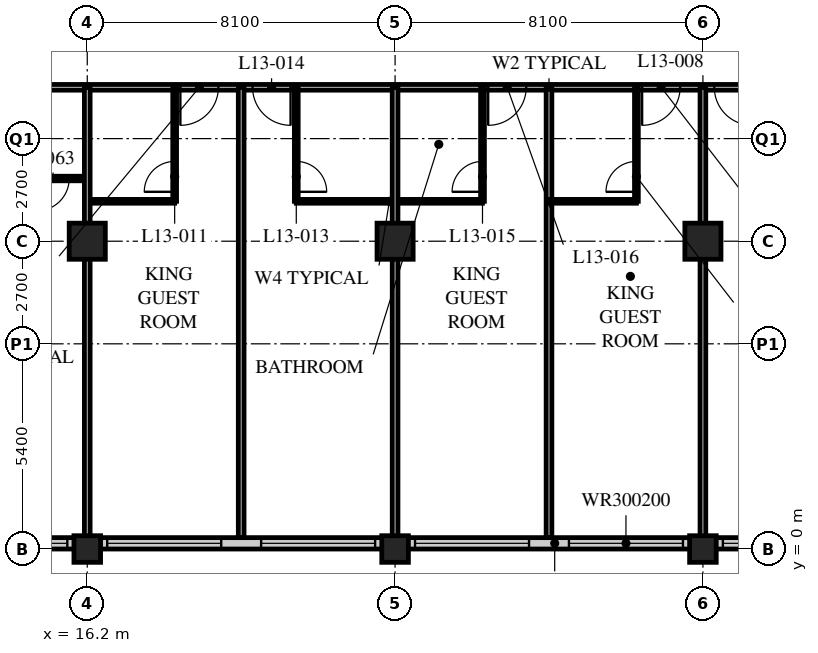
"""IFC4 building model, lengths in metres.
Left out: names, types, materials, properties, quantities, classifications, styles, units other than length and angle.
Written with IfcOpenShell. Run it as: python <this file> out.ifc"""

import sys

from ifc_helpers import new_model, si_unit, direction, frame, frame_2d, origin, origin_2d, place, context, subcontext, project, spatial, rectangle, hollow_rectangle, extrude, element, fill, save


model = new_model("IFC4")
c1 = context("Model", 3, precision=1e-05, world=origin(), true_north=direction((0.0, 1.0)))
c2 = subcontext(c1, "Body", "Model", "MODEL_VIEW")
j1 = project(units=[si_unit("LENGTHUNIT", "METRE"), si_unit("PLANEANGLEUNIT", "RADIAN")], contexts=[c1])
p1 = place(None, origin())
s1 = spatial("IfcSite", under=j1, at=p1, CompositionType="ELEMENT")
p2 = place(p1, origin())
s2 = spatial("IfcBuilding", under=s1, at=p2, CompositionType="ELEMENT")
p3 = place(p2, frame((0.0, 0.0, 56.8)))
s3 = spatial("IfcBuildingStorey", under=s2, at=p3, CompositionType="ELEMENT", Elevation=56.8)
p4 = place(p3, frame((16.2, 0.0, 0.0), z_axis=(0.0, 0.0, 1.0), x_axis=(1.0, 0.0, 0.0)))
e1 = element("IfcColumn", 1, at=p4, inside=s3, PredefinedType="COLUMN", context=c2, shape_type="SweptSolid", body=[
    extrude(hollow_rectangle(XDim=0.7, YDim=0.7, WallThickness=0.06, at=origin_2d()), origin(), (0.0, 0.0, 1.0), 3.4),
])
p5 = place(p3, frame((16.2, 8.1, 0.0), z_axis=(0.0, 0.0, 1.0), x_axis=(1.0, 0.0, 0.0)))
e2 = element("IfcColumn", 2, at=p5, inside=s3, PredefinedType="COLUMN", context=c2, shape_type="SweptSolid", body=[
    extrude(hollow_rectangle(XDim=0.95, YDim=0.95, WallThickness=0.095, at=origin_2d()), origin(), (0.0, 0.0, 1.0), 3.4),
])
p6 = place(p3, frame((24.3, 0.0, 0.0), z_axis=(0.0, 0.0, 1.0), x_axis=(1.0, 0.0, 0.0)))
e3 = element("IfcColumn", 3, at=p6, inside=s3, PredefinedType="COLUMN", context=c2, shape_type="SweptSolid", body=[
    extrude(hollow_rectangle(XDim=0.7, YDim=0.7, WallThickness=0.06, at=origin_2d()), origin(), (0.0, 0.0, 1.0), 3.4),
])
p7 = place(p3, frame((24.3, 8.1, 0.0), z_axis=(0.0, 0.0, 1.0), x_axis=(1.0, 0.0, 0.0)))
e4 = element("IfcColumn", 4, at=p7, inside=s3, PredefinedType="COLUMN", context=c2, shape_type="SweptSolid", body=[
    extrude(hollow_rectangle(XDim=0.95, YDim=0.95, WallThickness=0.095, at=origin_2d()), origin(), (0.0, 0.0, 1.0), 3.4),
])
p8 = place(p3, frame((32.4, 0.0, 0.0), z_axis=(0.0, 0.0, 1.0), x_axis=(1.0, 0.0, 0.0)))
e5 = element("IfcColumn", 5, at=p8, inside=s3, PredefinedType="COLUMN", context=c2, shape_type="SweptSolid", body=[
    extrude(hollow_rectangle(XDim=0.7, YDim=0.7, WallThickness=0.06, at=origin_2d()), origin(), (0.0, 0.0, 1.0), 3.4),
])
p9 = place(p3, frame((32.4, 8.1, 0.0), z_axis=(0.0, 0.0, 1.0), x_axis=(1.0, 0.0, 0.0)))
e6 = element("IfcColumn", 6, at=p9, inside=s3, PredefinedType="COLUMN", context=c2, shape_type="SweptSolid", body=[
    extrude(hollow_rectangle(XDim=0.95, YDim=0.95, WallThickness=0.095, at=origin_2d()), origin(), (0.0, 0.0, 1.0), 3.4),
])
p10 = place(p3, frame((8.4, 0.15, 0.0), z_axis=(0.0, 0.0, 1.0), x_axis=(1.0, 0.0, 0.0)))
e7 = element("IfcWall", 7, at=p10, inside=s3, PredefinedType="SOLIDWALL", context=c2, shape_type="SweptSolid", body=[
    extrude(rectangle(XDim=40.2, YDim=0.3, at=frame_2d((20.1, 0.0))), origin(), (0.0, 0.0, 1.0), 3.19),
])
p11 = place(p10, frame((0.225, 0.0, 0.9)))
e8 = element("IfcOpeningElement", 8, at=p11, cuts=e7, PredefinedType="OPENING", context=c2, shape_type="SweptSolid", body=[
    extrude(rectangle(XDim=3.0, YDim=2.0, at=frame_2d((1.5, 1.0))), frame((0.0, 0.16, 0.0), z_axis=(0.0, -1.0, 0.0), x_axis=(1.0, 0.0, 0.0)), (0.0, 0.0, 1.0), 0.32),
])
p12 = place(p10, frame((4.275, 0.0, 0.9)))
e9 = element("IfcOpeningElement", 9, at=p12, cuts=e7, PredefinedType="OPENING", context=c2, shape_type="SweptSolid", body=[
    extrude(rectangle(XDim=3.0, YDim=2.0, at=frame_2d((1.5, 1.0))), frame((0.0, 0.16, 0.0), z_axis=(0.0, -1.0, 0.0), x_axis=(1.0, 0.0, 0.0)), (0.0, 0.0, 1.0), 0.32),
])
p13 = place(p10, frame((8.325, 0.0, 0.9)))
e10 = element("IfcOpeningElement", 10, at=p13, cuts=e7, PredefinedType="OPENING", context=c2, shape_type="SweptSolid", body=[
    extrude(rectangle(XDim=3.0, YDim=2.0, at=frame_2d((1.5, 1.0))), frame((0.0, 0.16, 0.0), z_axis=(0.0, -1.0, 0.0), x_axis=(1.0, 0.0, 0.0)), (0.0, 0.0, 1.0), 0.32),
])
p14 = place(p10, frame((12.375, 0.0, 0.9)))
e11 = element("IfcOpeningElement", 11, at=p14, cuts=e7, PredefinedType="OPENING", context=c2, shape_type="SweptSolid", body=[
    extrude(rectangle(XDim=3.0, YDim=2.0, at=frame_2d((1.5, 1.0))), frame((0.0, 0.16, 0.0), z_axis=(0.0, -1.0, 0.0), x_axis=(1.0, 0.0, 0.0)), (0.0, 0.0, 1.0), 0.32),
])
p15 = place(p10, frame((16.425, 0.0, 0.9)))
e12 = element("IfcOpeningElement", 12, at=p15, cuts=e7, PredefinedType="OPENING", context=c2, shape_type="SweptSolid", body=[
    extrude(rectangle(XDim=3.0, YDim=2.0, at=frame_2d((1.5, 1.0))), frame((0.0, 0.16, 0.0), z_axis=(0.0, -1.0, 0.0), x_axis=(1.0, 0.0, 0.0)), (0.0, 0.0, 1.0), 0.32),
])
p16 = place(p10, frame((20.475, 0.0, 0.9)))
e13 = element("IfcOpeningElement", 13, at=p16, cuts=e7, PredefinedType="OPENING", context=c2, shape_type="SweptSolid", body=[
    extrude(rectangle(XDim=3.0, YDim=2.0, at=frame_2d((1.5, 1.0))), frame((0.0, 0.16, 0.0), z_axis=(0.0, -1.0, 0.0), x_axis=(1.0, 0.0, 0.0)), (0.0, 0.0, 1.0), 0.32),
])
p17 = place(p10, frame((24.525, 0.0, 0.9)))
e14 = element("IfcOpeningElement", 14, at=p17, cuts=e7, PredefinedType="OPENING", context=c2, shape_type="SweptSolid", body=[
    extrude(rectangle(XDim=3.0, YDim=2.0, at=frame_2d((1.5, 1.0))), frame((0.0, 0.16, 0.0), z_axis=(0.0, -1.0, 0.0), x_axis=(1.0, 0.0, 0.0)), (0.0, 0.0, 1.0), 0.32),
])
p18 = place(p10, frame((28.575, 0.0, 0.9)))
e15 = element("IfcOpeningElement", 15, at=p18, cuts=e7, PredefinedType="OPENING", context=c2, shape_type="SweptSolid", body=[
    extrude(rectangle(XDim=3.0, YDim=2.0, at=frame_2d((1.5, 1.0))), frame((0.0, 0.16, 0.0), z_axis=(0.0, -1.0, 0.0), x_axis=(1.0, 0.0, 0.0)), (0.0, 0.0, 1.0), 0.32),
])
p19 = place(p10, frame((32.625, 0.0, 0.9)))
e16 = element("IfcOpeningElement", 16, at=p19, cuts=e7, PredefinedType="OPENING", context=c2, shape_type="SweptSolid", body=[
    extrude(rectangle(XDim=3.0, YDim=2.0, at=frame_2d((1.5, 1.0))), frame((0.0, 0.16, 0.0), z_axis=(0.0, -1.0, 0.0), x_axis=(1.0, 0.0, 0.0)), (0.0, 0.0, 1.0), 0.32),
])
p20 = place(p10, frame((36.675, 0.0, 0.9)))
e17 = element("IfcOpeningElement", 17, at=p20, cuts=e7, PredefinedType="OPENING", context=c2, shape_type="SweptSolid", body=[
    extrude(rectangle(XDim=3.0, YDim=2.0, at=frame_2d((1.5, 1.0))), frame((0.0, 0.16, 0.0), z_axis=(0.0, -1.0, 0.0), x_axis=(1.0, 0.0, 0.0)), (0.0, 0.0, 1.0), 0.32),
])
p21 = place(p3, frame((12.15, 12.15, 0.0), z_axis=(0.0, 0.0, 1.0), x_axis=(1.0, 0.0, 0.0)))
e18 = element("IfcWall", 18, at=p21, inside=s3, PredefinedType="PARTITIONING", context=c2, shape_type="SweptSolid", body=[
    extrude(rectangle(XDim=32.4, YDim=0.15, at=frame_2d((16.2, 0.0))), origin(), (0.0, 0.0, 1.0), 3.19),
])
p22 = place(p21, frame((6.5, 0.0, 0.0)))
e19 = element("IfcOpeningElement", 19, at=p22, cuts=e18, PredefinedType="OPENING", context=c2, shape_type="SweptSolid", body=[
    extrude(rectangle(XDim=1.0, YDim=2.1, at=frame_2d((0.5, 1.05))), frame((0.0, 0.085, 0.0), z_axis=(0.0, -1.0, 0.0), x_axis=(1.0, 0.0, 0.0)), (0.0, 0.0, 1.0), 0.17),
])
p23 = place(p21, frame((8.4, 0.0, 0.0)))
e20 = element("IfcOpeningElement", 20, at=p23, cuts=e18, PredefinedType="OPENING", context=c2, shape_type="SweptSolid", body=[
    extrude(rectangle(XDim=1.0, YDim=2.1, at=frame_2d((0.5, 1.05))), frame((0.0, 0.085, 0.0), z_axis=(0.0, -1.0, 0.0), x_axis=(1.0, 0.0, 0.0)), (0.0, 0.0, 1.0), 0.17),
])
p24 = place(p21, frame((14.6, 0.0, 0.0)))
e21 = element("IfcOpeningElement", 21, at=p24, cuts=e18, PredefinedType="OPENING", context=c2, shape_type="SweptSolid", body=[
    extrude(rectangle(XDim=1.0, YDim=2.1, at=frame_2d((0.5, 1.05))), frame((0.0, 0.085, 0.0), z_axis=(0.0, -1.0, 0.0), x_axis=(1.0, 0.0, 0.0)), (0.0, 0.0, 1.0), 0.17),
])
p25 = place(p21, frame((18.65, 0.0, 0.0)))
e22 = element("IfcOpeningElement", 22, at=p25, cuts=e18, PredefinedType="OPENING", context=c2, shape_type="SweptSolid", body=[
    extrude(rectangle(XDim=1.0, YDim=2.1, at=frame_2d((0.5, 1.05))), frame((0.0, 0.085, 0.0), z_axis=(0.0, -1.0, 0.0), x_axis=(1.0, 0.0, 0.0)), (0.0, 0.0, 1.0), 0.17),
])
p26 = place(p21, frame((20.55, 0.0, 0.0)))
e23 = element("IfcOpeningElement", 23, at=p26, cuts=e18, PredefinedType="OPENING", context=c2, shape_type="SweptSolid", body=[
    extrude(rectangle(XDim=1.0, YDim=2.1, at=frame_2d((0.5, 1.05))), frame((0.0, 0.085, 0.0), z_axis=(0.0, -1.0, 0.0), x_axis=(1.0, 0.0, 0.0)), (0.0, 0.0, 1.0), 0.17),
])
p27 = place(p21, frame((26.75, 0.0, 0.0)))
e24 = element("IfcOpeningElement", 24, at=p27, cuts=e18, PredefinedType="OPENING", context=c2, shape_type="SweptSolid", body=[
    extrude(rectangle(XDim=1.0, YDim=2.1, at=frame_2d((0.5, 1.05))), frame((0.0, 0.085, 0.0), z_axis=(0.0, -1.0, 0.0), x_axis=(1.0, 0.0, 0.0)), (0.0, 0.0, 1.0), 0.17),
])
p28 = place(p21, frame((1.525, 0.0, 0.0)))
e25 = element("IfcOpeningElement", 25, at=p28, cuts=e18, PredefinedType="OPENING", context=c2, shape_type="SweptSolid", body=[
    extrude(rectangle(XDim=1.0, YDim=2.1, at=frame_2d((0.5, 1.05))), frame((0.0, 0.085, 0.0), z_axis=(0.0, -1.0, 0.0), x_axis=(1.0, 0.0, 0.0)), (0.0, 0.0, 1.0), 0.17),
])
p29 = place(p21, frame((29.875, 0.0, 0.0)))
e26 = element("IfcOpeningElement", 26, at=p29, cuts=e18, PredefinedType="OPENING", context=c2, shape_type="SweptSolid", body=[
    extrude(rectangle(XDim=1.0, YDim=2.1, at=frame_2d((0.5, 1.05))), frame((0.0, 0.085, 0.0), z_axis=(0.0, -1.0, 0.0), x_axis=(1.0, 0.0, 0.0)), (0.0, 0.0, 1.0), 0.17),
])
p30 = place(p3, frame((16.2, 9.15, 0.0), z_axis=(0.0, 0.0, 1.0), x_axis=(1.0, 0.0, 0.0)))
e27 = element("IfcWall", 27, at=p30, inside=s3, PredefinedType="PARTITIONING", context=c2, shape_type="SweptSolid", body=[
    extrude(rectangle(XDim=2.3, YDim=0.1, at=frame_2d((1.15, 0.0))), origin(), (0.0, 0.0, 1.0), 3.19),
])
p31 = place(p3, frame((18.5, 12.15, 0.0), z_axis=(0.0, 0.0, 1.0), x_axis=(0.0, -1.0, 0.0)))
e28 = element("IfcWall", 28, at=p31, inside=s3, PredefinedType="PARTITIONING", context=c2, shape_type="SweptSolid", body=[
    extrude(rectangle(XDim=3.0, YDim=0.1, at=frame_2d((1.5, 0.0))), origin(), (0.0, 0.0, 1.0), 3.19),
])
p32 = place(p31, frame((1.95, 0.0, 0.0)))
e29 = element("IfcOpeningElement", 29, at=p32, cuts=e28, PredefinedType="OPENING", context=c2, shape_type="SweptSolid", body=[
    extrude(rectangle(XDim=0.8, YDim=2.1, at=frame_2d((0.4, 1.05))), frame((0.0, 0.06, 0.0), z_axis=(0.0, -1.0, 0.0), x_axis=(1.0, 0.0, 0.0)), (0.0, 0.0, 1.0), 0.12),
])
p33 = place(p3, frame((20.25, 12.15, 0.0), z_axis=(0.0, 0.0, 1.0), x_axis=(0.0, -1.0, 0.0)))
e30 = element("IfcWall", 30, at=p33, inside=s3, PredefinedType="PARTITIONING", context=c2, shape_type="SweptSolid", body=[
    extrude(rectangle(XDim=11.85, YDim=0.15, at=frame_2d((5.925, 0.0))), origin(), (0.0, 0.0, 1.0), 3.19),
])
p34 = place(p3, frame((21.7, 9.15, 0.0), z_axis=(0.0, 0.0, 1.0), x_axis=(1.0, 0.0, 0.0)))
e31 = element("IfcWall", 31, at=p34, inside=s3, PredefinedType="PARTITIONING", context=c2, shape_type="SweptSolid", body=[
    extrude(rectangle(XDim=4.9, YDim=0.1, at=frame_2d((2.45, 0.0))), origin(), (0.0, 0.0, 1.0), 3.19),
])
p35 = place(p3, frame((21.7, 12.15, 0.0), z_axis=(0.0, 0.0, 1.0), x_axis=(0.0, -1.0, 0.0)))
e32 = element("IfcWall", 32, at=p35, inside=s3, PredefinedType="PARTITIONING", context=c2, shape_type="SweptSolid", body=[
    extrude(rectangle(XDim=3.0, YDim=0.1, at=frame_2d((1.5, 0.0))), origin(), (0.0, 0.0, 1.0), 3.19),
])
p36 = place(p35, frame((1.95, 0.0, 0.0)))
e33 = element("IfcOpeningElement", 33, at=p36, cuts=e32, PredefinedType="OPENING", context=c2, shape_type="SweptSolid", body=[
    extrude(rectangle(XDim=0.8, YDim=2.1, at=frame_2d((0.4, 1.05))), frame((0.0, 0.06, 0.0), z_axis=(0.0, -1.0, 0.0), x_axis=(1.0, 0.0, 0.0)), (0.0, 0.0, 1.0), 0.12),
])
p37 = place(p3, frame((24.3, 12.15, 0.0), z_axis=(0.0, 0.0, 1.0), x_axis=(0.0, -1.0, 0.0)))
e34 = element("IfcWall", 34, at=p37, inside=s3, PredefinedType="PARTITIONING", context=c2, shape_type="SweptSolid", body=[
    extrude(rectangle(XDim=11.85, YDim=0.15, at=frame_2d((5.925, 0.0))), origin(), (0.0, 0.0, 1.0), 2.578),
])
p38 = place(p3, frame((26.6, 12.15, 0.0), z_axis=(0.0, 0.0, 1.0), x_axis=(0.0, -1.0, 0.0)))
e35 = element("IfcWall", 35, at=p38, inside=s3, PredefinedType="PARTITIONING", context=c2, shape_type="SweptSolid", body=[
    extrude(rectangle(XDim=3.0, YDim=0.1, at=frame_2d((1.5, 0.0))), origin(), (0.0, 0.0, 1.0), 3.19),
])
p39 = place(p38, frame((1.95, 0.0, 0.0)))
e36 = element("IfcOpeningElement", 36, at=p39, cuts=e35, PredefinedType="OPENING", context=c2, shape_type="SweptSolid", body=[
    extrude(rectangle(XDim=0.8, YDim=2.1, at=frame_2d((0.4, 1.05))), frame((0.0, 0.06, 0.0), z_axis=(0.0, -1.0, 0.0), x_axis=(1.0, 0.0, 0.0)), (0.0, 0.0, 1.0), 0.12),
])
p40 = place(p3, frame((28.35, 12.15, 0.0), z_axis=(0.0, 0.0, 1.0), x_axis=(0.0, -1.0, 0.0)))
e37 = element("IfcWall", 37, at=p40, inside=s3, PredefinedType="PARTITIONING", context=c2, shape_type="SweptSolid", body=[
    extrude(rectangle(XDim=11.85, YDim=0.15, at=frame_2d((5.925, 0.0))), origin(), (0.0, 0.0, 1.0), 3.19),
])
p41 = place(p3, frame((28.35, 9.15, 0.0), z_axis=(0.0, 0.0, 1.0), x_axis=(1.0, 0.0, 0.0)))
e38 = element("IfcWall", 38, at=p41, inside=s3, PredefinedType="PARTITIONING", context=c2, shape_type="SweptSolid", body=[
    extrude(rectangle(XDim=2.3, YDim=0.1, at=frame_2d((1.15, 0.0))), origin(), (0.0, 0.0, 1.0), 3.19),
])
p42 = place(p3, frame((30.65, 12.15, 0.0), z_axis=(0.0, 0.0, 1.0), x_axis=(0.0, -1.0, 0.0)))
e39 = element("IfcWall", 39, at=p42, inside=s3, PredefinedType="PARTITIONING", context=c2, shape_type="SweptSolid", body=[
    extrude(rectangle(XDim=3.0, YDim=0.1, at=frame_2d((1.5, 0.0))), origin(), (0.0, 0.0, 1.0), 3.19),
])
p43 = place(p42, frame((1.95, 0.0, 0.0)))
e40 = element("IfcOpeningElement", 40, at=p43, cuts=e39, PredefinedType="OPENING", context=c2, shape_type="SweptSolid", body=[
    extrude(rectangle(XDim=0.8, YDim=2.1, at=frame_2d((0.4, 1.05))), frame((0.0, 0.06, 0.0), z_axis=(0.0, -1.0, 0.0), x_axis=(1.0, 0.0, 0.0)), (0.0, 0.0, 1.0), 0.12),
])
p44 = place(p3, frame((32.4, 12.15, 0.0), z_axis=(0.0, 0.0, 1.0), x_axis=(0.0, -1.0, 0.0)))
e41 = element("IfcWall", 41, at=p44, inside=s3, PredefinedType="PARTITIONING", context=c2, shape_type="SweptSolid", body=[
    extrude(rectangle(XDim=11.85, YDim=0.15, at=frame_2d((5.925, 0.0))), origin(), (0.0, 0.0, 1.0), 2.578),
])
p45 = place(p3, frame((8.15, 9.75, 0.0), z_axis=(0.0, 0.0, 1.0), x_axis=(1.0, 0.0, 0.0)))
e42 = element("IfcWall", 42, at=p45, inside=s3, PredefinedType="PARTITIONING", context=c2, shape_type="SweptSolid", body=[
    extrude(rectangle(XDim=8.05, YDim=0.12, at=frame_2d((4.025, 0.0))), origin(), (0.0, 0.0, 1.0), 3.19),
])
p46 = place(p45, frame((6.725, 0.0, 0.0)))
e43 = element("IfcOpeningElement", 43, at=p46, cuts=e42, PredefinedType="OPENING", context=c2, shape_type="SweptSolid", body=[
    extrude(rectangle(XDim=0.85, YDim=2.1, at=frame_2d((0.425, 1.05))), frame((0.0, 0.07, 0.0), z_axis=(0.0, -1.0, 0.0), x_axis=(1.0, 0.0, 0.0)), (0.0, 0.0, 1.0), 0.14),
])
p47 = place(p45, frame((2.875, 0.0, 0.0)))
e44 = element("IfcOpeningElement", 44, at=p47, cuts=e42, PredefinedType="OPENING", context=c2, shape_type="SweptSolid", body=[
    extrude(rectangle(XDim=0.85, YDim=2.1, at=frame_2d((0.425, 1.05))), frame((0.0, 0.07, 0.0), z_axis=(0.0, -1.0, 0.0), x_axis=(1.0, 0.0, 0.0)), (0.0, 0.0, 1.0), 0.14),
])
p48 = place(p3, frame((16.2, 12.15, 0.0), z_axis=(0.0, 0.0, 1.0), x_axis=(0.0, -1.0, 0.0)))
e45 = element("IfcWall", 45, at=p48, inside=s3, PredefinedType="PARTITIONING", context=c2, shape_type="SweptSolid", body=[
    extrude(rectangle(XDim=11.85, YDim=0.15, at=frame_2d((5.925, 0.0))), origin(), (0.0, 0.0, 1.0), 2.578),
])
p49 = place(p12, origin())
e46 = element("IfcWindow", 46, at=p49, inside=s3, PartitioningType="SINGLE_PANEL", PredefinedType="WINDOW", context=c2, shape_type="SweptSolid", body=[
    extrude(rectangle(XDim=3.0, YDim=2.0, at=frame_2d((1.5, 1.0))), frame((0.0, 0.03, 0.0), z_axis=(0.0, -1.0, 0.0), x_axis=(1.0, 0.0, 0.0)), (0.0, 0.0, 1.0), 0.06),
])
fill(e9, e46)
p50 = place(p13, origin())
e47 = element("IfcWindow", 47, at=p50, inside=s3, PartitioningType="SINGLE_PANEL", PredefinedType="WINDOW", context=c2, shape_type="SweptSolid", body=[
    extrude(rectangle(XDim=3.0, YDim=2.0, at=frame_2d((1.5, 1.0))), frame((0.0, 0.03, 0.0), z_axis=(0.0, -1.0, 0.0), x_axis=(1.0, 0.0, 0.0)), (0.0, 0.0, 1.0), 0.06),
])
fill(e10, e47)
p51 = place(p14, origin())
e48 = element("IfcWindow", 48, at=p51, inside=s3, PartitioningType="SINGLE_PANEL", PredefinedType="WINDOW", context=c2, shape_type="SweptSolid", body=[
    extrude(rectangle(XDim=3.0, YDim=2.0, at=frame_2d((1.5, 1.0))), frame((0.0, 0.03, 0.0), z_axis=(0.0, -1.0, 0.0), x_axis=(1.0, 0.0, 0.0)), (0.0, 0.0, 1.0), 0.06),
])
fill(e11, e48)
p52 = place(p15, origin())
e49 = element("IfcWindow", 49, at=p52, inside=s3, PartitioningType="SINGLE_PANEL", PredefinedType="WINDOW", context=c2, shape_type="SweptSolid", body=[
    extrude(rectangle(XDim=3.0, YDim=2.0, at=frame_2d((1.5, 1.0))), frame((0.0, 0.03, 0.0), z_axis=(0.0, -1.0, 0.0), x_axis=(1.0, 0.0, 0.0)), (0.0, 0.0, 1.0), 0.06),
])
fill(e12, e49)
p53 = place(p16, origin())
e50 = element("IfcWindow", 50, at=p53, inside=s3, PartitioningType="SINGLE_PANEL", PredefinedType="WINDOW", context=c2, shape_type="SweptSolid", body=[
    extrude(rectangle(XDim=3.0, YDim=2.0, at=frame_2d((1.5, 1.0))), frame((0.0, 0.03, 0.0), z_axis=(0.0, -1.0, 0.0), x_axis=(1.0, 0.0, 0.0)), (0.0, 0.0, 1.0), 0.06),
])
fill(e13, e50)
p54 = place(p17, origin())
e51 = element("IfcWindow", 51, at=p54, inside=s3, PartitioningType="SINGLE_PANEL", PredefinedType="WINDOW", context=c2, shape_type="SweptSolid", body=[
    extrude(rectangle(XDim=3.0, YDim=2.0, at=frame_2d((1.5, 1.0))), frame((0.0, 0.03, 0.0), z_axis=(0.0, -1.0, 0.0), x_axis=(1.0, 0.0, 0.0)), (0.0, 0.0, 1.0), 0.06),
])
fill(e14, e51)
p55 = place(p32, origin())
e52 = element("IfcDoor", 52, at=p55, inside=s3, OperationType="SINGLE_SWING_LEFT", PredefinedType="DOOR", context=c2, shape_type="SweptSolid", body=[
    extrude(rectangle(XDim=0.8, YDim=2.1, at=frame_2d((0.4, 1.05))), frame((0.0, 0.025, 0.0), z_axis=(0.0, -1.0, 0.0), x_axis=(1.0, 0.0, 0.0)), (0.0, 0.0, 1.0), 0.05),
])
fill(e29, e52)
p56 = place(p22, origin())
e53 = element("IfcDoor", 53, at=p56, inside=s3, OperationType="SINGLE_SWING_RIGHT", PredefinedType="DOOR", context=c2, shape_type="SweptSolid", body=[
    extrude(rectangle(XDim=1.0, YDim=2.1, at=frame_2d((0.5, 1.05))), frame((0.0, 0.025, 0.0), z_axis=(0.0, -1.0, 0.0), x_axis=(1.0, 0.0, 0.0)), (0.0, 0.0, 1.0), 0.05),
])
fill(e19, e53)
p57 = place(p36, origin())
e54 = element("IfcDoor", 54, at=p57, inside=s3, OperationType="SINGLE_SWING_RIGHT", PredefinedType="DOOR", context=c2, shape_type="SweptSolid", body=[
    extrude(rectangle(XDim=0.8, YDim=2.1, at=frame_2d((0.4, 1.05))), frame((0.0, 0.025, 0.0), z_axis=(0.0, -1.0, 0.0), x_axis=(1.0, 0.0, 0.0)), (0.0, 0.0, 1.0), 0.05),
])
fill(e33, e54)
p58 = place(p23, origin())
e55 = element("IfcDoor", 55, at=p58, inside=s3, OperationType="SINGLE_SWING_LEFT", PredefinedType="DOOR", context=c2, shape_type="SweptSolid", body=[
    extrude(rectangle(XDim=1.0, YDim=2.1, at=frame_2d((0.5, 1.05))), frame((0.0, 0.025, 0.0), z_axis=(0.0, -1.0, 0.0), x_axis=(1.0, 0.0, 0.0)), (0.0, 0.0, 1.0), 0.05),
])
fill(e20, e55)
p59 = place(p39, origin())
e56 = element("IfcDoor", 56, at=p59, inside=s3, OperationType="SINGLE_SWING_LEFT", PredefinedType="DOOR", context=c2, shape_type="SweptSolid", body=[
    extrude(rectangle(XDim=0.8, YDim=2.1, at=frame_2d((0.4, 1.05))), frame((0.0, 0.025, 0.0), z_axis=(0.0, -1.0, 0.0), x_axis=(1.0, 0.0, 0.0)), (0.0, 0.0, 1.0), 0.05),
])
fill(e36, e56)
p60 = place(p24, origin())
e57 = element("IfcDoor", 57, at=p60, inside=s3, OperationType="SINGLE_SWING_RIGHT", PredefinedType="DOOR", context=c2, shape_type="SweptSolid", body=[
    extrude(rectangle(XDim=1.0, YDim=2.1, at=frame_2d((0.5, 1.05))), frame((0.0, 0.025, 0.0), z_axis=(0.0, -1.0, 0.0), x_axis=(1.0, 0.0, 0.0)), (0.0, 0.0, 1.0), 0.05),
])
fill(e21, e57)
p61 = place(p43, origin())
e58 = element("IfcDoor", 58, at=p61, inside=s3, OperationType="SINGLE_SWING_LEFT", PredefinedType="DOOR", context=c2, shape_type="SweptSolid", body=[
    extrude(rectangle(XDim=0.8, YDim=2.1, at=frame_2d((0.4, 1.05))), frame((0.0, 0.025, 0.0), z_axis=(0.0, -1.0, 0.0), x_axis=(1.0, 0.0, 0.0)), (0.0, 0.0, 1.0), 0.05),
])
fill(e40, e58)
p62 = place(p25, origin())
e59 = element("IfcDoor", 59, at=p62, inside=s3, OperationType="SINGLE_SWING_RIGHT", PredefinedType="DOOR", context=c2, shape_type="SweptSolid", body=[
    extrude(rectangle(XDim=1.0, YDim=2.1, at=frame_2d((0.5, 1.05))), frame((0.0, 0.025, 0.0), z_axis=(0.0, -1.0, 0.0), x_axis=(1.0, 0.0, 0.0)), (0.0, 0.0, 1.0), 0.05),
])
fill(e22, e59)
p63 = place(p26, origin())
e60 = element("IfcDoor", 60, at=p63, inside=s3, OperationType="SINGLE_SWING_LEFT", PredefinedType="DOOR", context=c2, shape_type="SweptSolid", body=[
    extrude(rectangle(XDim=1.0, YDim=2.1, at=frame_2d((0.5, 1.05))), frame((0.0, 0.025, 0.0), z_axis=(0.0, -1.0, 0.0), x_axis=(1.0, 0.0, 0.0)), (0.0, 0.0, 1.0), 0.05),
])
fill(e23, e60)
p64 = place(p46, origin())
e61 = element("IfcDoor", 61, at=p64, inside=s3, OperationType="SINGLE_SWING_RIGHT", PredefinedType="DOOR", context=c2, shape_type="SweptSolid", body=[
    extrude(rectangle(XDim=0.85, YDim=2.1, at=frame_2d((0.425, 1.05))), frame((0.0, 0.025, 0.0), z_axis=(0.0, -1.0, 0.0), x_axis=(1.0, 0.0, 0.0)), (0.0, 0.0, 1.0), 0.05),
])
fill(e43, e61)
save(model, sys.argv[1])
